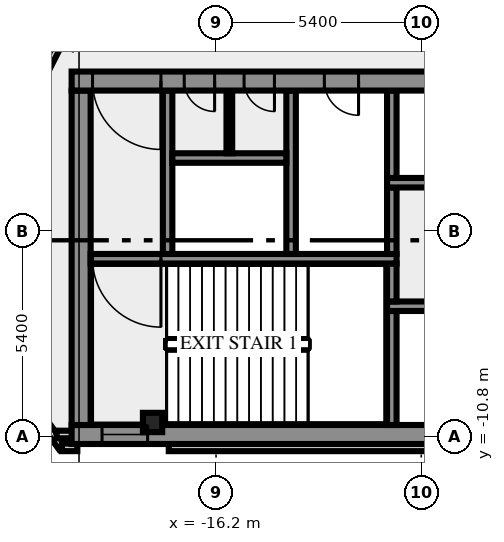
"""IFC4 building model, lengths in metres.
Left out: names, types, materials, properties, quantities, classifications, styles, units other than length and angle.
Written with IfcOpenShell. Run it as: python <this file> out.ifc"""

import sys

from ifc_helpers import new_model, si_unit, direction, frame, frame_2d, origin, origin_2d, place, context, subcontext, project, spatial, rectangle, hollow_rectangle, extrude, element, fill, save


model = new_model("IFC4")
c1 = context("Model", 3, precision=1e-05, world=origin(), true_north=direction((0.0, 1.0)))
c2 = subcontext(c1, "Body", "Model", "MODEL_VIEW")
j1 = project(units=[si_unit("LENGTHUNIT", "METRE"), si_unit("PLANEANGLEUNIT", "RADIAN")], contexts=[c1])
p1 = place(None, origin())
s1 = spatial("IfcSite", under=j1, at=p1, CompositionType="ELEMENT")
p2 = place(p1, origin())
s2 = spatial("IfcBuilding", under=s1, at=p2, CompositionType="ELEMENT")
p3 = place(p2, frame((0.0, 0.0, 355.0)))
s3 = spatial("IfcBuildingStorey", under=s2, at=p3, CompositionType="ELEMENT", Elevation=355.0)
p4 = place(p3, frame((-17.87, -10.434, 0.0), z_axis=(0.0, 0.0, 1.0), x_axis=(1.0, 0.0, 0.0)))
e1 = element("IfcColumn", 1, at=p4, inside=s3, PredefinedType="COLUMN", context=c2, shape_type="SweptSolid", body=[
    extrude(hollow_rectangle(XDim=0.508, YDim=0.508, WallThickness=0.016, at=origin_2d()), origin(), (0.0, 0.0, 1.0), 7.55),
])
p5 = place(p3, frame((-21.312, -2.355, 0.0), z_axis=(0.0, 0.0, 1.0), x_axis=(0.453964632037, 0.891019703968, 0.0)))
e2 = element("IfcWall", 2, at=p5, inside=s3, PredefinedType="SOLIDWALL", context=c2, shape_type="SweptSolid", body=[
    extrude(rectangle(XDim=2.354, YDim=0.2, at=frame_2d((1.177, 0.0))), origin(), (0.0, 0.0, 1.0), 7.55),
])
p6 = place(p5, frame((0.611, 0.0, 0.0)))
e3 = element("IfcOpeningElement", 3, at=p6, cuts=e2, PredefinedType="OPENING", context=c2, shape_type="SweptSolid", body=[
    extrude(rectangle(XDim=0.9, YDim=2.1, at=frame_2d((0.45, 1.05))), frame((0.0, 0.11, 0.0), z_axis=(0.0, -1.0, 0.0), x_axis=(1.0, 0.0, 0.0)), (0.0, 0.0, 1.0), 0.22),
])
p7 = place(p3, frame((-21.833, -8.909, 0.0), z_axis=(0.0, 0.0, 1.0), x_axis=(0.587766567315, -0.809030569476, 0.0)))
e4 = element("IfcWall", 4, at=p7, inside=s3, PredefinedType="SOLIDWALL", context=c2, shape_type="SweptSolid", body=[
    extrude(rectangle(XDim=2.688, YDim=0.2, at=frame_2d((1.344, 0.0))), origin(), (0.0, 0.0, 1.0), 7.55),
])
p8 = place(p3, frame((-20.256, -11.088, 0.0), z_axis=(0.0, 0.0, 1.0), x_axis=(1.0, 0.0, 0.0)))
e5 = element("IfcWall", 5, at=p8, inside=s3, PredefinedType="SOLIDWALL", context=c2, shape_type="SweptSolid", body=[
    extrude(rectangle(XDim=0.406, YDim=0.2, at=frame_2d((0.203, 0.0))), origin(), (0.0, 0.0, 1.0), 7.55),
])
p9 = place(p3, frame((-17.444, -11.088, 0.0), z_axis=(0.0, 0.0, 1.0), x_axis=(1.0, 0.0, 0.0)))
e6 = element("IfcWall", 6, at=p9, inside=s3, PredefinedType="SOLIDWALL", context=c2, shape_type="SweptSolid", body=[
    extrude(rectangle(XDim=34.888, YDim=0.2, at=frame_2d((17.444, 0.0))), origin(), (0.0, 0.0, 1.0), 7.55),
])
p10 = place(p3, frame((-19.98, -10.75, 0.0), z_axis=(0.0, 0.0, 1.0), x_axis=(-1.0, 0.0, 0.0)))
e7 = element("IfcWall", 7, at=p10, inside=s3, PredefinedType="SOLIDWALL", context=c2, shape_type="SweptSolid", body=[
    extrude(rectangle(XDim=0.417, YDim=0.2, at=frame_2d((0.208, 0.0))), origin(), (0.0, 0.0, 1.0), 7.55),
])
p11 = place(p3, frame((-20.0, -10.75, 0.0), z_axis=(0.0, 0.0, 1.0), x_axis=(1.0, 0.0, 0.0)))
e8 = element("IfcWall", 8, at=p11, inside=s3, PredefinedType="SHEAR", context=c2, shape_type="SweptSolid", body=[
    extrude(rectangle(XDim=40.0, YDim=0.5, at=frame_2d((20.0, 0.0))), origin(), (0.0, 0.0, 1.0), 7.55),
])
p12 = place(p11, frame((0.8, 0.0, 1.0)))
e9 = element("IfcOpeningElement", 9, at=p12, cuts=e8, PredefinedType="OPENING", context=c2, shape_type="SweptSolid", body=[
    extrude(rectangle(XDim=1.2, YDim=1.2, at=frame_2d((0.6, 0.6))), frame((0.0, 0.26, 0.0), z_axis=(0.0, -1.0, 0.0), x_axis=(1.0, 0.0, 0.0)), (0.0, 0.0, 1.0), 0.52),
])
p13 = place(p11, frame((38.0, 0.0, 1.0)))
e10 = element("IfcOpeningElement", 10, at=p13, cuts=e8, PredefinedType="OPENING", context=c2, shape_type="SweptSolid", body=[
    extrude(rectangle(XDim=1.2, YDim=1.2, at=frame_2d((0.6, 0.6))), frame((0.0, 0.26, 0.0), z_axis=(0.0, -1.0, 0.0), x_axis=(1.0, 0.0, 0.0)), (0.0, 0.0, 1.0), 0.52),
])
p14 = place(p3, frame((-19.75, -10.5, 0.0), z_axis=(0.0, 0.0, 1.0), x_axis=(0.0, 1.0, 0.0)))
e11 = element("IfcWall", 11, at=p14, inside=s3, PredefinedType="SHEAR", context=c2, shape_type="SweptSolid", body=[
    extrude(rectangle(XDim=8.8, YDim=0.5, at=frame_2d((4.4, 0.0))), origin(), (0.0, 0.0, 1.0), 7.55),
])
p15 = place(p3, frame((-11.575, -10.5, 0.0), z_axis=(0.0, 0.0, 1.0), x_axis=(0.0, 1.0, 0.0)))
e12 = element("IfcWall", 12, at=p15, inside=s3, PredefinedType="SHEAR", context=c2, shape_type="SweptSolid", body=[
    extrude(rectangle(XDim=3.0, YDim=0.25, at=frame_2d((1.5, 0.0))), origin(), (0.0, 0.0, 1.0), 7.55),
])
p16 = place(p3, frame((11.7, -7.375, 0.0), z_axis=(0.0, 0.0, 1.0), x_axis=(-1.0, 0.0, 0.0)))
e13 = element("IfcWall", 13, at=p16, inside=s3, PredefinedType="SHEAR", context=c2, shape_type="SweptSolid", body=[
    extrude(rectangle(XDim=23.4, YDim=0.25, at=frame_2d((11.7, 0.0))), origin(), (0.0, 0.0, 1.0), 7.55),
])
p17 = place(p16, frame((14.2, 0.0, 0.0)))
e14 = element("IfcOpeningElement", 14, at=p17, cuts=e13, PredefinedType="OPENING", context=c2, shape_type="SweptSolid", body=[
    extrude(rectangle(XDim=0.9, YDim=2.1, at=frame_2d((0.45, 1.05))), frame((0.0, 0.135, 0.0), z_axis=(0.0, -1.0, 0.0), x_axis=(1.0, 0.0, 0.0)), (0.0, 0.0, 1.0), 0.27),
])
p18 = place(p16, frame((12.35, 0.0, 0.0)))
e15 = element("IfcOpeningElement", 15, at=p18, cuts=e13, PredefinedType="OPENING", context=c2, shape_type="SweptSolid", body=[
    extrude(rectangle(XDim=0.9, YDim=2.1, at=frame_2d((0.45, 1.05))), frame((0.0, 0.135, 0.0), z_axis=(0.0, -1.0, 0.0), x_axis=(1.0, 0.0, 0.0)), (0.0, 0.0, 1.0), 0.27),
])
p19 = place(p16, frame((10.65, 0.0, 0.0)))
e16 = element("IfcOpeningElement", 16, at=p19, cuts=e13, PredefinedType="OPENING", context=c2, shape_type="SweptSolid", body=[
    extrude(rectangle(XDim=0.9, YDim=2.1, at=frame_2d((0.45, 1.05))), frame((0.0, 0.135, 0.0), z_axis=(0.0, -1.0, 0.0), x_axis=(1.0, 0.0, 0.0)), (0.0, 0.0, 1.0), 0.27),
])
p20 = place(p16, frame((7.6, 0.0, 0.0)))
e17 = element("IfcOpeningElement", 17, at=p20, cuts=e13, PredefinedType="OPENING", context=c2, shape_type="SweptSolid", body=[
    extrude(rectangle(XDim=0.9, YDim=2.1, at=frame_2d((0.45, 1.05))), frame((0.0, 0.135, 0.0), z_axis=(0.0, -1.0, 0.0), x_axis=(1.0, 0.0, 0.0)), (0.0, 0.0, 1.0), 0.27),
])
p21 = place(p16, frame((2.338, 0.0, 0.0)))
e18 = element("IfcOpeningElement", 18, at=p21, cuts=e13, PredefinedType="OPENING", context=c2, shape_type="SweptSolid", body=[
    extrude(rectangle(XDim=0.9, YDim=2.1, at=frame_2d((0.45, 1.05))), frame((0.0, 0.135, 0.0), z_axis=(0.0, -1.0, 0.0), x_axis=(1.0, 0.0, 0.0)), (0.0, 0.0, 1.0), 0.27),
])
p22 = place(p3, frame((-11.575, -7.25, 0.0), z_axis=(0.0, 0.0, 1.0), x_axis=(0.0, 1.0, 0.0)))
e19 = element("IfcWall", 19, at=p22, inside=s3, PredefinedType="SHEAR", context=c2, shape_type="SweptSolid", body=[
    extrude(rectangle(XDim=1.0, YDim=0.25, at=frame_2d((0.5, 0.0))), origin(), (0.0, 0.0, 1.0), 7.55),
])
p23 = place(p3, frame((-11.45, -6.125, 0.0), z_axis=(0.0, 0.0, 1.0), x_axis=(-1.0, 0.0, 0.0)))
e20 = element("IfcWall", 20, at=p23, inside=s3, PredefinedType="SHEAR", context=c2, shape_type="SweptSolid", body=[
    extrude(rectangle(XDim=8.05, YDim=0.25, at=frame_2d((4.025, 0.0))), origin(), (0.0, 0.0, 1.0), 7.55),
])
p24 = place(p23, frame((6.2, 0.0, 0.0)))
e21 = element("IfcOpeningElement", 21, at=p24, cuts=e20, PredefinedType="OPENING", context=c2, shape_type="SweptSolid", body=[
    extrude(rectangle(XDim=1.8, YDim=2.1, at=frame_2d((0.9, 1.05))), frame((0.0, 0.135, 0.0), z_axis=(0.0, -1.0, 0.0), x_axis=(1.0, 0.0, 0.0)), (0.0, 0.0, 1.0), 0.27),
])
for number, where, z_axis, x_axis in (
    (22, (-17.475, -6.0, 0.0), (0.0, 0.0, 1.0), (0.0, 1.0, 0.0)),
    (23, (-14.225, -6.0, 0.0), (0.0, 0.0, 1.0), (0.0, 1.0, 0.0)),
):
    element("IfcWall", number, at=place(p3, frame(where, z_axis=z_axis, x_axis=x_axis)), inside=s3, PredefinedType="SHEAR", context=c2, shape_type="SweptSolid", body=[
        extrude(rectangle(XDim=4.3, YDim=0.25, at=frame_2d((2.15, 0.0))), origin(), (0.0, 0.0, 1.0), 7.55),
    ])
p25 = place(p3, frame((-11.575, -6.0, 0.0), z_axis=(0.0, 0.0, 1.0), x_axis=(0.0, 1.0, 0.0)))
e24 = element("IfcWall", 24, at=p25, inside=s3, PredefinedType="SHEAR", context=c2, shape_type="SweptSolid", body=[
    extrude(rectangle(XDim=1.75, YDim=0.25, at=frame_2d((0.875, 0.0))), origin(), (0.0, 0.0, 1.0), 7.55),
])
p26 = place(p3, frame((-11.7, -4.125, 0.0), z_axis=(0.0, 0.0, 1.0), x_axis=(1.0, 0.0, 0.0)))
e25 = element("IfcWall", 25, at=p26, inside=s3, PredefinedType="SHEAR", context=c2, shape_type="SweptSolid", body=[
    extrude(rectangle(XDim=7.75, YDim=0.25, at=frame_2d((3.875, 0.0))), origin(), (0.0, 0.0, 1.0), 7.55),
])
p27 = place(p3, frame((-11.575, -4.0, 0.0), z_axis=(0.0, 0.0, 1.0), x_axis=(0.0, 1.0, 0.0)))
e26 = element("IfcWall", 26, at=p27, inside=s3, PredefinedType="SHEAR", context=c2, shape_type="SweptSolid", body=[
    extrude(rectangle(XDim=2.3, YDim=0.25, at=frame_2d((1.15, 0.0))), origin(), (0.0, 0.0, 1.0), 7.55),
])
p28 = place(p3, frame((-17.35, -3.475, 0.0), z_axis=(0.0, 0.0, 1.0), x_axis=(1.0, 0.0, 0.0)))
e27 = element("IfcWall", 27, at=p28, inside=s3, PredefinedType="SHEAR", context=c2, shape_type="SweptSolid", body=[
    extrude(rectangle(XDim=3.0, YDim=0.25, at=frame_2d((1.5, 0.0))), origin(), (0.0, 0.0, 1.0), 7.55),
])
p29 = place(p3, frame((-15.85, -3.35, 0.0), z_axis=(0.0, 0.0, 1.0), x_axis=(0.0, 1.0, 0.0)))
e28 = element("IfcWall", 28, at=p29, inside=s3, PredefinedType="PARTITIONING", context=c2, shape_type="SweptSolid", body=[
    extrude(rectangle(XDim=1.65, YDim=0.15, at=frame_2d((0.825, 0.0))), origin(), (0.0, 0.0, 1.0), 7.55),
])
p30 = place(p3, frame((20.0, -1.45, 0.0), z_axis=(0.0, 0.0, 1.0), x_axis=(-1.0, 0.0, 0.0)))
e29 = element("IfcWall", 29, at=p30, inside=s3, PredefinedType="SHEAR", context=c2, shape_type="SweptSolid", body=[
    extrude(rectangle(XDim=40.0, YDim=0.5, at=frame_2d((20.0, 0.0))), origin(), (0.0, 0.0, 1.0), 7.55),
])
p31 = place(p30, frame((37.65, 0.0, 0.0)))
e30 = element("IfcOpeningElement", 30, at=p31, cuts=e29, PredefinedType="OPENING", context=c2, shape_type="SweptSolid", body=[
    extrude(rectangle(XDim=1.8, YDim=2.1, at=frame_2d((0.9, 1.05))), frame((0.0, 0.26, 0.0), z_axis=(0.0, -1.0, 0.0), x_axis=(1.0, 0.0, 0.0)), (0.0, 0.0, 1.0), 0.52),
])
p32 = place(p30, frame((36.238, 0.0, 0.0)))
e31 = element("IfcOpeningElement", 31, at=p32, cuts=e29, PredefinedType="OPENING", context=c2, shape_type="SweptSolid", body=[
    extrude(rectangle(XDim=0.8, YDim=2.1, at=frame_2d((0.4, 1.05))), frame((0.0, 0.26, 0.0), z_axis=(0.0, -1.0, 0.0), x_axis=(1.0, 0.0, 0.0)), (0.0, 0.0, 1.0), 0.52),
])
p33 = place(p30, frame((34.663, 0.0, 0.0)))
e32 = element("IfcOpeningElement", 32, at=p33, cuts=e29, PredefinedType="OPENING", context=c2, shape_type="SweptSolid", body=[
    extrude(rectangle(XDim=0.8, YDim=2.1, at=frame_2d((0.4, 1.05))), frame((0.0, 0.26, 0.0), z_axis=(0.0, -1.0, 0.0), x_axis=(1.0, 0.0, 0.0)), (0.0, 0.0, 1.0), 0.52),
])
p34 = place(p30, frame((32.45, 0.0, 0.0)))
e33 = element("IfcOpeningElement", 33, at=p34, cuts=e29, PredefinedType="OPENING", context=c2, shape_type="SweptSolid", body=[
    extrude(rectangle(XDim=0.9, YDim=2.1, at=frame_2d((0.45, 1.05))), frame((0.0, 0.26, 0.0), z_axis=(0.0, -1.0, 0.0), x_axis=(1.0, 0.0, 0.0)), (0.0, 0.0, 1.0), 0.52),
])
p35 = place(p30, frame((20.25, 0.0, 0.0)))
e34 = element("IfcOpeningElement", 34, at=p35, cuts=e29, PredefinedType="OPENING", context=c2, shape_type="SweptSolid", body=[
    extrude(rectangle(XDim=2.0, YDim=2.1, at=frame_2d((1.0, 1.05))), frame((0.0, 0.26, 0.0), z_axis=(0.0, -1.0, 0.0), x_axis=(1.0, 0.0, 0.0)), (0.0, 0.0, 1.0), 0.52),
])
p36 = place(p30, frame((14.413, 0.0, 0.0)))
e35 = element("IfcOpeningElement", 35, at=p36, cuts=e29, PredefinedType="OPENING", context=c2, shape_type="SweptSolid", body=[
    extrude(rectangle(XDim=0.9, YDim=2.1, at=frame_2d((0.45, 1.05))), frame((0.0, 0.26, 0.0), z_axis=(0.0, -1.0, 0.0), x_axis=(1.0, 0.0, 0.0)), (0.0, 0.0, 1.0), 0.52),
])
p37 = place(p30, frame((12.05, 0.0, 0.0)))
e36 = element("IfcOpeningElement", 36, at=p37, cuts=e29, PredefinedType="OPENING", context=c2, shape_type="SweptSolid", body=[
    extrude(rectangle(XDim=0.9, YDim=2.1, at=frame_2d((0.45, 1.05))), frame((0.0, 0.26, 0.0), z_axis=(0.0, -1.0, 0.0), x_axis=(1.0, 0.0, 0.0)), (0.0, 0.0, 1.0), 0.52),
])
p38 = place(p30, frame((9.387, 0.0, 0.0)))
e37 = element("IfcOpeningElement", 37, at=p38, cuts=e29, PredefinedType="OPENING", context=c2, shape_type="SweptSolid", body=[
    extrude(rectangle(XDim=0.9, YDim=2.1, at=frame_2d((0.45, 1.05))), frame((0.0, 0.26, 0.0), z_axis=(0.0, -1.0, 0.0), x_axis=(1.0, 0.0, 0.0)), (0.0, 0.0, 1.0), 0.52),
])
p39 = place(p30, frame((6.65, 0.0, 0.0)))
e38 = element("IfcOpeningElement", 38, at=p39, cuts=e29, PredefinedType="OPENING", context=c2, shape_type="SweptSolid", body=[
    extrude(rectangle(XDim=0.9, YDim=2.1, at=frame_2d((0.45, 1.05))), frame((0.0, 0.26, 0.0), z_axis=(0.0, -1.0, 0.0), x_axis=(1.0, 0.0, 0.0)), (0.0, 0.0, 1.0), 0.52),
])
p40 = place(p30, frame((3.7, 0.0, 0.0)))
e39 = element("IfcOpeningElement", 39, at=p40, cuts=e29, PredefinedType="OPENING", context=c2, shape_type="SweptSolid", body=[
    extrude(rectangle(XDim=0.9, YDim=2.1, at=frame_2d((0.45, 1.05))), frame((0.0, 0.26, 0.0), z_axis=(0.0, -1.0, 0.0), x_axis=(1.0, 0.0, 0.0)), (0.0, 0.0, 1.0), 0.52),
])
p41 = place(p30, frame((0.55, 0.0, 0.0)))
e40 = element("IfcOpeningElement", 40, at=p41, cuts=e29, PredefinedType="OPENING", context=c2, shape_type="SweptSolid", body=[
    extrude(rectangle(XDim=1.8, YDim=2.1, at=frame_2d((0.9, 1.05))), frame((0.0, 0.26, 0.0), z_axis=(0.0, -1.0, 0.0), x_axis=(1.0, 0.0, 0.0)), (0.0, 0.0, 1.0), 0.52),
])
p42 = place(p12, origin())
e41 = element("IfcWindow", 41, at=p42, inside=s3, PartitioningType="SINGLE_PANEL", PredefinedType="WINDOW", context=c2, shape_type="SweptSolid", body=[
    extrude(rectangle(XDim=1.2, YDim=1.2, at=frame_2d((0.6, 0.6))), frame((0.0, 0.03, 0.0), z_axis=(0.0, -1.0, 0.0), x_axis=(1.0, 0.0, 0.0)), (0.0, 0.0, 1.0), 0.06),
])
fill(e9, e41)
p43 = place(p24, origin())
e42 = element("IfcDoor", 42, at=p43, inside=s3, OperationType="DOUBLE_DOOR_SINGLE_SWING", PredefinedType="DOOR", context=c2, shape_type="SweptSolid", body=[
    extrude(rectangle(XDim=1.8, YDim=2.1, at=frame_2d((0.9, 1.05))), frame((0.0, 0.025, 0.0), z_axis=(0.0, -1.0, 0.0), x_axis=(1.0, 0.0, 0.0)), (0.0, 0.0, 1.0), 0.05),
])
fill(e21, e42)
p44 = place(p31, origin())
e43 = element("IfcDoor", 43, at=p44, inside=s3, OperationType="DOUBLE_DOOR_SINGLE_SWING", PredefinedType="DOOR", context=c2, shape_type="SweptSolid", body=[
    extrude(rectangle(XDim=1.8, YDim=2.1, at=frame_2d((0.9, 1.05))), frame((0.0, 0.025, 0.0), z_axis=(0.0, -1.0, 0.0), x_axis=(1.0, 0.0, 0.0)), (0.0, 0.0, 1.0), 0.05),
])
fill(e30, e43)
p45 = place(p32, origin())
e44 = element("IfcDoor", 44, at=p45, inside=s3, OperationType="SINGLE_SWING_RIGHT", PredefinedType="DOOR", context=c2, shape_type="SweptSolid", body=[
    extrude(rectangle(XDim=0.8, YDim=2.1, at=frame_2d((0.4, 1.05))), frame((0.0, 0.025, 0.0), z_axis=(0.0, -1.0, 0.0), x_axis=(1.0, 0.0, 0.0)), (0.0, 0.0, 1.0), 0.05),
])
fill(e31, e44)
p46 = place(p33, origin())
e45 = element("IfcDoor", 45, at=p46, inside=s3, OperationType="SINGLE_SWING_RIGHT", PredefinedType="DOOR", context=c2, shape_type="SweptSolid", body=[
    extrude(rectangle(XDim=0.8, YDim=2.1, at=frame_2d((0.4, 1.05))), frame((0.0, 0.025, 0.0), z_axis=(0.0, -1.0, 0.0), x_axis=(1.0, 0.0, 0.0)), (0.0, 0.0, 1.0), 0.05),
])
fill(e32, e45)
p47 = place(p34, origin())
e46 = element("IfcDoor", 46, at=p47, inside=s3, OperationType="SINGLE_SWING_RIGHT", PredefinedType="DOOR", context=c2, shape_type="SweptSolid", body=[
    extrude(rectangle(XDim=0.9, YDim=2.1, at=frame_2d((0.45, 1.05))), frame((0.0, 0.025, 0.0), z_axis=(0.0, -1.0, 0.0), x_axis=(1.0, 0.0, 0.0)), (0.0, 0.0, 1.0), 0.05),
])
fill(e33, e46)
save(model, sys.argv[1])
